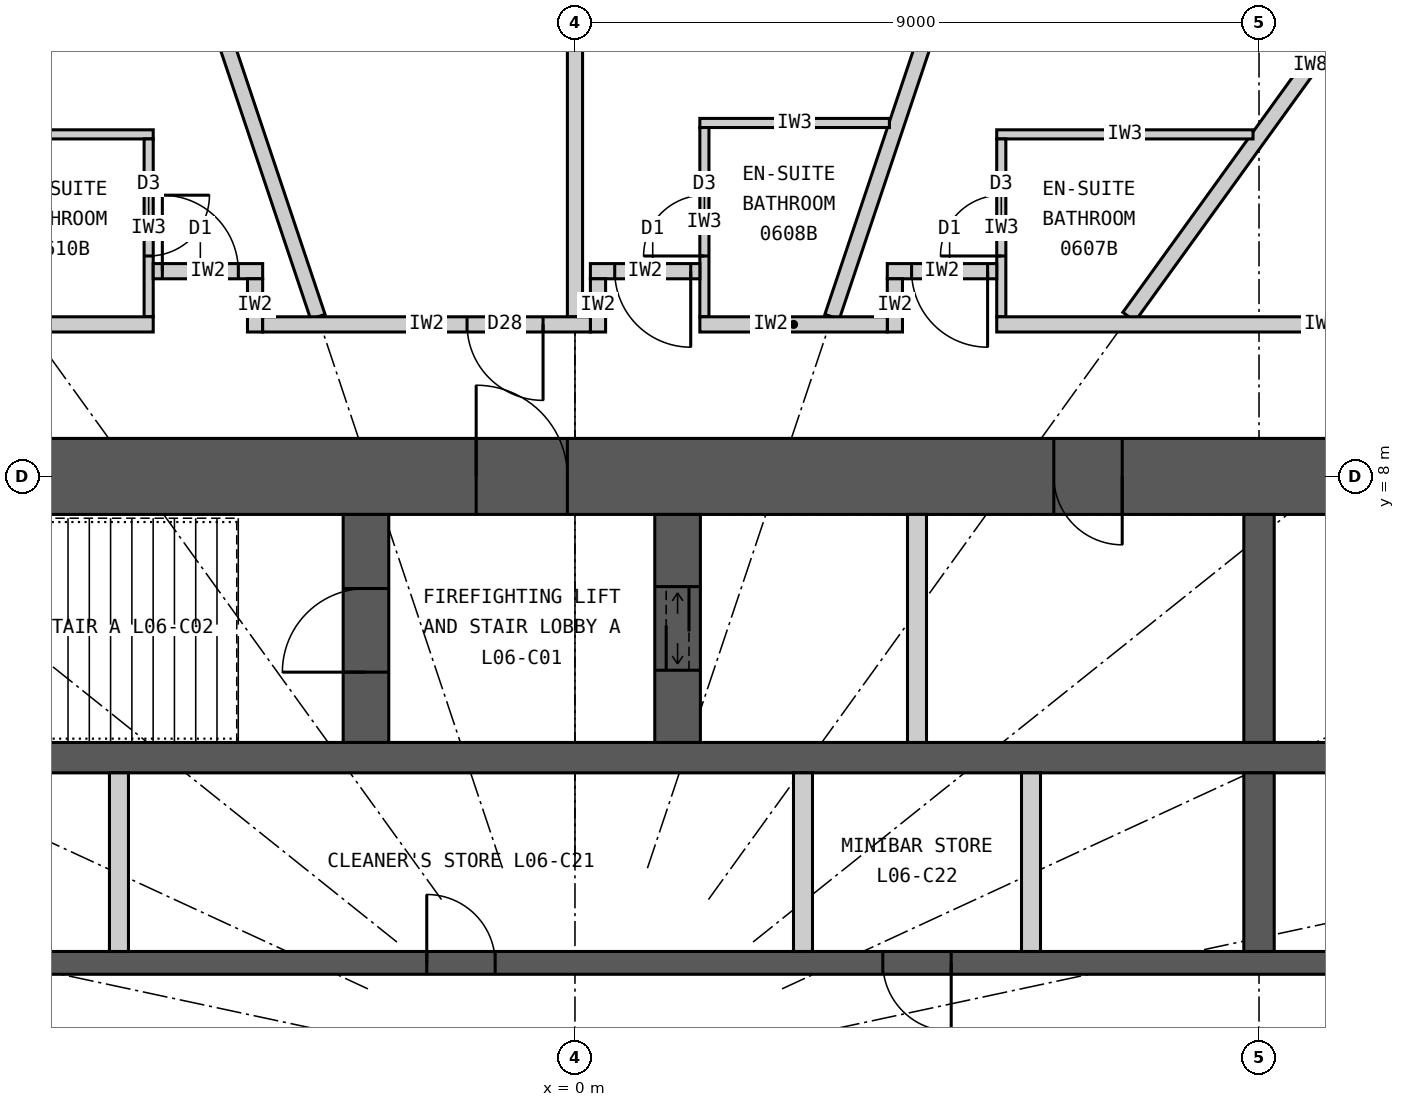
"""IFC4 building model, lengths in metres.
Left out: names, types, materials, properties, quantities, classifications, styles, units other than length and angle.
Written with IfcOpenShell. Run it as: python <this file> out.ifc"""

import sys

from ifc_helpers import new_model, si_unit, direction, frame, frame_2d, origin, place, context, subcontext, project, spatial, rectangle, extrude, element, fill, save


model = new_model("IFC4")
c1 = context("Model", 3, precision=1e-05, world=origin(), true_north=direction((0.0, 1.0)))
c2 = subcontext(c1, "Body", "Model", "MODEL_VIEW")
j1 = project(units=[si_unit("LENGTHUNIT", "METRE"), si_unit("PLANEANGLEUNIT", "RADIAN")], contexts=[c1])
p1 = place(None, origin())
s1 = spatial("IfcSite", under=j1, at=p1, CompositionType="ELEMENT")
p2 = place(p1, origin())
s2 = spatial("IfcBuilding", under=s1, at=p2, CompositionType="ELEMENT")
p3 = place(p2, frame((0.0, 0.0, 32.7)))
s3 = spatial("IfcBuildingStorey", under=s2, at=p3, CompositionType="ELEMENT", Elevation=32.7)
p4 = place(p3, frame((-12.5, 8.0, 0.0), z_axis=(0.0, 0.0, 1.0), x_axis=(1.0, 0.0, 0.0)))
e1 = element("IfcWall", 1, at=p4, inside=s3, PredefinedType="SHEAR", context=c2, shape_type="SweptSolid", body=[
    extrude(rectangle(XDim=25.0, YDim=1.0, at=frame_2d((12.5, 0.0))), origin(), (0.0, 0.0, 1.0), 3.3),
])
p5 = place(p4, frame((11.2, 0.0, 0.0)))
e2 = element("IfcOpeningElement", 2, at=p5, cuts=e1, PredefinedType="OPENING", context=c2, shape_type="SweptSolid", body=[
    extrude(rectangle(XDim=1.2, YDim=2.2, at=frame_2d((0.6, 1.1))), frame((0.0, 0.51, 0.0), z_axis=(0.0, -1.0, 0.0), x_axis=(1.0, 0.0, 0.0)), (0.0, 0.0, 1.0), 1.02),
])
p6 = place(p4, frame((18.8, 0.0, 0.0)))
e3 = element("IfcOpeningElement", 3, at=p6, cuts=e1, PredefinedType="OPENING", context=c2, shape_type="SweptSolid", body=[
    extrude(rectangle(XDim=0.9, YDim=2.2, at=frame_2d((0.45, 1.1))), frame((0.0, 0.51, 0.0), z_axis=(0.0, -1.0, 0.0), x_axis=(1.0, 0.0, 0.0)), (0.0, 0.0, 1.0), 1.02),
])
p7 = place(p3, frame((-11.5, 4.3, 0.0), z_axis=(0.0, 0.0, 1.0), x_axis=(1.0, 0.0, 0.0)))
e4 = element("IfcWall", 4, at=p7, inside=s3, PredefinedType="SHEAR", context=c2, shape_type="SweptSolid", body=[
    extrude(rectangle(XDim=23.0, YDim=0.4, at=frame_2d((11.5, 0.0))), origin(), (0.0, 0.0, 1.0), 3.3),
])
p8 = place(p3, frame((-11.5, 1.6, 0.0), z_axis=(0.0, 0.0, 1.0), x_axis=(1.0, 0.0, 0.0)))
e5 = element("IfcWall", 5, at=p8, inside=s3, PredefinedType="SHEAR", context=c2, shape_type="SweptSolid", body=[
    extrude(rectangle(XDim=23.0, YDim=0.3, at=frame_2d((11.5, 0.0))), origin(), (0.0, 0.0, 1.0), 3.3),
])
p9 = place(p8, frame((0.45, 0.0, 0.0)))
e6 = element("IfcOpeningElement", 6, at=p9, cuts=e5, PredefinedType="OPENING", context=c2, shape_type="SweptSolid", body=[
    extrude(rectangle(XDim=1.1, YDim=2.2, at=frame_2d((0.55, 1.1))), frame((0.0, 0.16, 0.0), z_axis=(0.0, -1.0, 0.0), x_axis=(1.0, 0.0, 0.0)), (0.0, 0.0, 1.0), 0.32),
])
p10 = place(p8, frame((3.45, 0.0, 0.0)))
e7 = element("IfcOpeningElement", 7, at=p10, cuts=e5, PredefinedType="OPENING", context=c2, shape_type="SweptSolid", body=[
    extrude(rectangle(XDim=1.1, YDim=2.2, at=frame_2d((0.55, 1.1))), frame((0.0, 0.16, 0.0), z_axis=(0.0, -1.0, 0.0), x_axis=(1.0, 0.0, 0.0)), (0.0, 0.0, 1.0), 0.32),
])
p11 = place(p8, frame((9.55, 0.0, 0.0)))
e8 = element("IfcOpeningElement", 8, at=p11, cuts=e5, PredefinedType="OPENING", context=c2, shape_type="SweptSolid", body=[
    extrude(rectangle(XDim=0.9, YDim=2.2, at=frame_2d((0.45, 1.1))), frame((0.0, 0.16, 0.0), z_axis=(0.0, -1.0, 0.0), x_axis=(1.0, 0.0, 0.0)), (0.0, 0.0, 1.0), 0.32),
])
p12 = place(p8, frame((15.55, 0.0, 0.0)))
e9 = element("IfcOpeningElement", 9, at=p12, cuts=e5, PredefinedType="OPENING", context=c2, shape_type="SweptSolid", body=[
    extrude(rectangle(XDim=0.9, YDim=2.2, at=frame_2d((0.45, 1.1))), frame((0.0, 0.16, 0.0), z_axis=(0.0, -1.0, 0.0), x_axis=(1.0, 0.0, 0.0)), (0.0, 0.0, 1.0), 0.32),
])
p13 = place(p3, frame((9.0, 4.5, 0.0), z_axis=(0.0, 0.0, 1.0), x_axis=(0.0, 1.0, 0.0)))
e10 = element("IfcWall", 10, at=p13, inside=s3, PredefinedType="SHEAR", context=c2, shape_type="SweptSolid", body=[
    extrude(rectangle(XDim=3.0, YDim=0.4, at=frame_2d((1.5, 0.0))), origin(), (0.0, 0.0, 1.0), 3.3),
])
p14 = place(p3, frame((9.0, 1.75, 0.0), z_axis=(0.0, 0.0, 1.0), x_axis=(0.0, 1.0, 0.0)))
e11 = element("IfcWall", 11, at=p14, inside=s3, PredefinedType="SHEAR", context=c2, shape_type="SweptSolid", body=[
    extrude(rectangle(XDim=2.35, YDim=0.4, at=frame_2d((1.175, 0.0))), origin(), (0.0, 0.0, 1.0), 3.3),
])
p15 = place(p3, frame((-2.75, 4.5, 0.0), z_axis=(0.0, 0.0, 1.0), x_axis=(0.0, 1.0, 0.0)))
e12 = element("IfcWall", 12, at=p15, inside=s3, PredefinedType="SHEAR", context=c2, shape_type="SweptSolid", body=[
    extrude(rectangle(XDim=3.0, YDim=0.6, at=frame_2d((1.5, 0.0))), origin(), (0.0, 0.0, 1.0), 3.3),
])
p16 = place(p15, frame((0.925, 0.0, 0.0)))
e13 = element("IfcOpeningElement", 13, at=p16, cuts=e12, PredefinedType="OPENING", context=c2, shape_type="SweptSolid", body=[
    extrude(rectangle(XDim=1.1, YDim=2.2, at=frame_2d((0.55, 1.1))), frame((0.0, 0.31, 0.0), z_axis=(0.0, -1.0, 0.0), x_axis=(1.0, 0.0, 0.0)), (0.0, 0.0, 1.0), 0.62),
])
p17 = place(p3, frame((1.35, 4.5, 0.0), z_axis=(0.0, 0.0, 1.0), x_axis=(0.0, 1.0, 0.0)))
e14 = element("IfcWall", 14, at=p17, inside=s3, PredefinedType="SHEAR", context=c2, shape_type="SweptSolid", body=[
    extrude(rectangle(XDim=3.0, YDim=0.6, at=frame_2d((1.5, 0.0))), origin(), (0.0, 0.0, 1.0), 3.3),
])
p18 = place(p17, frame((0.95, 0.0, 0.0)))
e15 = element("IfcOpeningElement", 15, at=p18, cuts=e14, PredefinedType="OPENING", context=c2, shape_type="SweptSolid", body=[
    extrude(rectangle(XDim=1.1, YDim=2.2, at=frame_2d((0.55, 1.1))), frame((0.0, 0.31, 0.0), z_axis=(0.0, -1.0, 0.0), x_axis=(1.0, 0.0, 0.0)), (0.0, 0.0, 1.0), 0.62),
])
p19 = place(p3, frame((4.5, 4.5, 0.0), z_axis=(0.0, 0.0, 1.0), x_axis=(0.0, 1.0, 0.0)))
e16 = element("IfcWall", 16, at=p19, inside=s3, PredefinedType="PARTITIONING", context=c2, shape_type="SweptSolid", body=[
    extrude(rectangle(XDim=3.0, YDim=0.25, at=frame_2d((1.5, 0.0))), origin(), (0.0, 0.0, 1.0), 3.3),
])
for number, where, z_axis, x_axis in (
    (17, (-6.0, 1.75, 0.0), (0.0, 0.0, 1.0), (0.0, 1.0, 0.0)),
    (18, (3.0, 1.75, 0.0), (0.0, 0.0, 1.0), (0.0, 1.0, 0.0)),
    (19, (6.0, 1.75, 0.0), (0.0, 0.0, 1.0), (0.0, 1.0, 0.0)),
):
    element("IfcWall", number, at=place(p3, frame(where, z_axis=z_axis, x_axis=x_axis)), inside=s3, PredefinedType="PARTITIONING", context=c2, shape_type="SweptSolid", body=[
        extrude(rectangle(XDim=2.35, YDim=0.25, at=frame_2d((1.175, 0.0))), origin(), (0.0, 0.0, 1.0), 3.3),
    ])
p20 = place(p3, frame((7.289, 10.1, 0.0), z_axis=(0.0, 0.0, 1.0), x_axis=(0.585216319319, 0.810877216108, 0.0)))
e20 = element("IfcWall", 20, at=p20, inside=s3, PredefinedType="PARTITIONING", context=c2, shape_type="SweptSolid", body=[
    extrude(rectangle(XDim=8.16, YDim=0.2, at=frame_2d((4.08, 0.0))), origin(), (0.0, 0.0, 1.0), 2.32),
])
p21 = place(p3, frame((3.383, 10.1, 0.0), z_axis=(0.0, 0.0, 1.0), x_axis=(0.317593727596, 0.948226884344, 0.0)))
e21 = element("IfcWall", 21, at=p21, inside=s3, PredefinedType="PARTITIONING", context=c2, shape_type="SweptSolid", body=[
    extrude(rectangle(XDim=8.899, YDim=0.2, at=frame_2d((4.449, 0.0))), origin(), (0.0, 0.0, 1.0), 2.32),
])
p22 = place(p3, frame((0.0, 10.1, 0.0), z_axis=(0.0, 0.0, 1.0), x_axis=(0.0, 1.0, 0.0)))
e22 = element("IfcWall", 22, at=p22, inside=s3, PredefinedType="PARTITIONING", context=c2, shape_type="SweptSolid", body=[
    extrude(rectangle(XDim=9.05, YDim=0.2, at=frame_2d((4.525, 0.0))), origin(), (0.0, 0.0, 1.0), 2.32),
])
p23 = place(p3, frame((-3.383, 10.1, 0.0), z_axis=(0.0, 0.0, 1.0), x_axis=(-0.317593727596, 0.948226884344, 0.0)))
e23 = element("IfcWall", 23, at=p23, inside=s3, PredefinedType="PARTITIONING", context=c2, shape_type="SweptSolid", body=[
    extrude(rectangle(XDim=8.899, YDim=0.2, at=frame_2d((4.449, 0.0))), origin(), (0.0, 0.0, 1.0), 2.32),
])
p24 = place(p3, frame((8.921, 12.5, 0.0), z_axis=(0.0, 0.0, 1.0), x_axis=(-1.0, 0.0, 0.0)))
e24 = element("IfcWall", 24, at=p24, inside=s3, PredefinedType="PARTITIONING", context=c2, shape_type="SweptSolid", body=[
    extrude(rectangle(XDim=3.372, YDim=0.12, at=frame_2d((1.686, 0.0))), origin(), (0.0, 0.0, 1.0), 3.12),
])
p25 = place(p3, frame((5.609, 10.1, 0.0), z_axis=(0.0, 0.0, 1.0), x_axis=(0.0, 1.0, 0.0)))
e25 = element("IfcWall", 25, at=p25, inside=s3, PredefinedType="PARTITIONING", context=c2, shape_type="SweptSolid", body=[
    extrude(rectangle(XDim=2.34, YDim=0.12, at=frame_2d((1.17, 0.0))), origin(), (0.0, 0.0, 1.0), 3.12),
])
p26 = place(p25, frame((0.8, 0.0, 0.0)))
e26 = element("IfcOpeningElement", 26, at=p26, cuts=e25, PredefinedType="OPENING", context=c2, shape_type="SweptSolid", body=[
    extrude(rectangle(XDim=0.8, YDim=2.1, at=frame_2d((0.4, 1.05))), frame((0.0, 0.07, 0.0), z_axis=(0.0, -1.0, 0.0), x_axis=(1.0, 0.0, 0.0)), (0.0, 0.0, 1.0), 0.14),
])
p27 = place(p3, frame((4.137, 12.65, 0.0), z_axis=(0.0, 0.0, 1.0), x_axis=(-1.0, 0.0, 0.0)))
e27 = element("IfcWall", 27, at=p27, inside=s3, PredefinedType="PARTITIONING", context=c2, shape_type="SweptSolid", body=[
    extrude(rectangle(XDim=2.494, YDim=0.12, at=frame_2d((1.247, 0.0))), origin(), (0.0, 0.0, 1.0), 3.12),
])
p28 = place(p3, frame((1.703, 10.1, 0.0), z_axis=(0.0, 0.0, 1.0), x_axis=(0.0, 1.0, 0.0)))
e28 = element("IfcWall", 28, at=p28, inside=s3, PredefinedType="PARTITIONING", context=c2, shape_type="SweptSolid", body=[
    extrude(rectangle(XDim=2.49, YDim=0.12, at=frame_2d((1.245, 0.0))), origin(), (0.0, 0.0, 1.0), 3.12),
])
p29 = place(p28, frame((0.8, 0.0, 0.0)))
e29 = element("IfcOpeningElement", 29, at=p29, cuts=e28, PredefinedType="OPENING", context=c2, shape_type="SweptSolid", body=[
    extrude(rectangle(XDim=0.8, YDim=2.1, at=frame_2d((0.4, 1.05))), frame((0.0, 0.07, 0.0), z_axis=(0.0, -1.0, 0.0), x_axis=(1.0, 0.0, 0.0)), (0.0, 0.0, 1.0), 0.14),
])
p30 = place(p3, frame((-8.921, 12.5, 0.0), z_axis=(0.0, 0.0, 1.0), x_axis=(1.0, 0.0, 0.0)))
e30 = element("IfcWall", 30, at=p30, inside=s3, PredefinedType="PARTITIONING", context=c2, shape_type="SweptSolid", body=[
    extrude(rectangle(XDim=3.372, YDim=0.12, at=frame_2d((1.686, 0.0))), origin(), (0.0, 0.0, 1.0), 3.12),
])
p31 = place(p3, frame((-5.609, 10.1, 0.0), z_axis=(0.0, 0.0, 1.0), x_axis=(0.0, 1.0, 0.0)))
e31 = element("IfcWall", 31, at=p31, inside=s3, PredefinedType="PARTITIONING", context=c2, shape_type="SweptSolid", body=[
    extrude(rectangle(XDim=2.34, YDim=0.12, at=frame_2d((1.17, 0.0))), origin(), (0.0, 0.0, 1.0), 3.12),
])
p32 = place(p31, frame((0.8, 0.0, 0.0)))
e32 = element("IfcOpeningElement", 32, at=p32, cuts=e31, PredefinedType="OPENING", context=c2, shape_type="SweptSolid", body=[
    extrude(rectangle(XDim=0.8, YDim=2.1, at=frame_2d((0.4, 1.05))), frame((0.0, 0.07, 0.0), z_axis=(0.0, -1.0, 0.0), x_axis=(1.0, 0.0, 0.0)), (0.0, 0.0, 1.0), 0.14),
])
p33 = place(p3, frame((4.109, 10.7, 0.0), z_axis=(0.0, 0.0, 1.0), x_axis=(1.0, 0.0, 0.0)))
e33 = element("IfcWall", 33, at=p33, inside=s3, PredefinedType="PARTITIONING", context=c2, shape_type="SweptSolid", body=[
    extrude(rectangle(XDim=1.44, YDim=0.2, at=frame_2d((0.72, 0.0))), origin(), (0.0, 0.0, 1.0), 3.12),
])
p34 = place(p33, frame((0.32, 0.0, 0.0)))
e34 = element("IfcOpeningElement", 34, at=p34, cuts=e33, PredefinedType="OPENING", context=c2, shape_type="SweptSolid", body=[
    extrude(rectangle(XDim=1.0, YDim=2.2, at=frame_2d((0.5, 1.1))), frame((0.0, 0.11, 0.0), z_axis=(0.0, -1.0, 0.0), x_axis=(1.0, 0.0, 0.0)), (0.0, 0.0, 1.0), 0.22),
])
p35 = place(p3, frame((4.209, 9.9, 0.0), z_axis=(0.0, 0.0, 1.0), x_axis=(0.0, 1.0, 0.0)))
e35 = element("IfcWall", 35, at=p35, inside=s3, PredefinedType="PARTITIONING", context=c2, shape_type="SweptSolid", body=[
    extrude(rectangle(XDim=0.7, YDim=0.2, at=frame_2d((0.35, 0.0))), origin(), (0.0, 0.0, 1.0), 3.12),
])
p36 = place(p3, frame((0.203, 10.7, 0.0), z_axis=(0.0, 0.0, 1.0), x_axis=(1.0, 0.0, 0.0)))
e36 = element("IfcWall", 36, at=p36, inside=s3, PredefinedType="PARTITIONING", context=c2, shape_type="SweptSolid", body=[
    extrude(rectangle(XDim=1.44, YDim=0.2, at=frame_2d((0.72, 0.0))), origin(), (0.0, 0.0, 1.0), 3.12),
])
p37 = place(p36, frame((0.32, 0.0, 0.0)))
e37 = element("IfcOpeningElement", 37, at=p37, cuts=e36, PredefinedType="OPENING", context=c2, shape_type="SweptSolid", body=[
    extrude(rectangle(XDim=1.0, YDim=2.2, at=frame_2d((0.5, 1.1))), frame((0.0, 0.11, 0.0), z_axis=(0.0, -1.0, 0.0), x_axis=(1.0, 0.0, 0.0)), (0.0, 0.0, 1.0), 0.22),
])
p38 = place(p3, frame((0.303, 9.9, 0.0), z_axis=(0.0, 0.0, 1.0), x_axis=(0.0, 1.0, 0.0)))
e38 = element("IfcWall", 38, at=p38, inside=s3, PredefinedType="PARTITIONING", context=c2, shape_type="SweptSolid", body=[
    extrude(rectangle(XDim=0.7, YDim=0.2, at=frame_2d((0.35, 0.0))), origin(), (0.0, 0.0, 1.0), 3.12),
])
p39 = place(p3, frame((-5.549, 10.7, 0.0), z_axis=(0.0, 0.0, 1.0), x_axis=(1.0, 0.0, 0.0)))
e39 = element("IfcWall", 39, at=p39, inside=s3, PredefinedType="PARTITIONING", context=c2, shape_type="SweptSolid", body=[
    extrude(rectangle(XDim=1.44, YDim=0.2, at=frame_2d((0.72, 0.0))), origin(), (0.0, 0.0, 1.0), 3.12),
])
p40 = place(p39, frame((0.12, 0.0, 0.0)))
e40 = element("IfcOpeningElement", 40, at=p40, cuts=e39, PredefinedType="OPENING", context=c2, shape_type="SweptSolid", body=[
    extrude(rectangle(XDim=1.0, YDim=2.2, at=frame_2d((0.5, 1.1))), frame((0.0, 0.11, 0.0), z_axis=(0.0, -1.0, 0.0), x_axis=(1.0, 0.0, 0.0)), (0.0, 0.0, 1.0), 0.22),
])
p41 = place(p3, frame((-4.209, 9.9, 0.0), z_axis=(0.0, 0.0, 1.0), x_axis=(0.0, 1.0, 0.0)))
e41 = element("IfcWall", 41, at=p41, inside=s3, PredefinedType="PARTITIONING", context=c2, shape_type="SweptSolid", body=[
    extrude(rectangle(XDim=0.7, YDim=0.2, at=frame_2d((0.35, 0.0))), origin(), (0.0, 0.0, 1.0), 3.12),
])
p42 = place(p3, frame((-10.179, 10.0, 0.0), z_axis=(0.0, 0.0, 1.0), x_axis=(1.0, 0.0, 0.0)))
e42 = element("IfcWall", 42, at=p42, inside=s3, PredefinedType="PARTITIONING", context=c2, shape_type="SweptSolid", body=[
    extrude(rectangle(XDim=4.63, YDim=0.2, at=frame_2d((2.315, 0.0))), origin(), (0.0, 0.0, 1.0), 3.12),
])
p43 = place(p3, frame((-4.109, 10.0, 0.0), z_axis=(0.0, 0.0, 1.0), x_axis=(1.0, 0.0, 0.0)))
e43 = element("IfcWall", 43, at=p43, inside=s3, PredefinedType="PARTITIONING", context=c2, shape_type="SweptSolid", body=[
    extrude(rectangle(XDim=4.312, YDim=0.2, at=frame_2d((2.156, 0.0))), origin(), (0.0, 0.0, 1.0), 3.12),
])
p44 = place(p43, frame((2.689, 0.0, 0.0)))
e44 = element("IfcOpeningElement", 44, at=p44, cuts=e43, PredefinedType="OPENING", context=c2, shape_type="SweptSolid", body=[
    extrude(rectangle(XDim=1.0, YDim=2.2, at=frame_2d((0.5, 1.1))), frame((0.0, 0.11, 0.0), z_axis=(0.0, -1.0, 0.0), x_axis=(1.0, 0.0, 0.0)), (0.0, 0.0, 1.0), 0.22),
])
p45 = place(p3, frame((1.643, 10.0, 0.0), z_axis=(0.0, 0.0, 1.0), x_axis=(1.0, 0.0, 0.0)))
e45 = element("IfcWall", 45, at=p45, inside=s3, PredefinedType="PARTITIONING", context=c2, shape_type="SweptSolid", body=[
    extrude(rectangle(XDim=2.466, YDim=0.2, at=frame_2d((1.233, 0.0))), origin(), (0.0, 0.0, 1.0), 3.12),
])
p46 = place(p3, frame((5.549, 10.0, 0.0), z_axis=(0.0, 0.0, 1.0), x_axis=(1.0, 0.0, 0.0)))
e46 = element("IfcWall", 46, at=p46, inside=s3, PredefinedType="PARTITIONING", context=c2, shape_type="SweptSolid", body=[
    extrude(rectangle(XDim=8.551, YDim=0.2, at=frame_2d((4.275, 0.0))), origin(), (0.0, 0.0, 1.0), 3.12),
])
p47 = place(p46, frame((5.656, 0.0, 0.0)))
e47 = element("IfcOpeningElement", 47, at=p47, cuts=e46, PredefinedType="OPENING", context=c2, shape_type="SweptSolid", body=[
    extrude(rectangle(XDim=1.0, YDim=2.2, at=frame_2d((0.5, 1.1))), frame((0.0, 0.11, 0.0), z_axis=(0.0, -1.0, 0.0), x_axis=(1.0, 0.0, 0.0)), (0.0, 0.0, 1.0), 0.22),
])
p48 = place(p26, origin())
e48 = element("IfcDoor", 48, at=p48, inside=s3, OperationType="SINGLE_SWING_LEFT", PredefinedType="DOOR", context=c2, shape_type="SweptSolid", body=[
    extrude(rectangle(XDim=0.8, YDim=2.1, at=frame_2d((0.4, 1.05))), frame((0.0, 0.025, 0.0), z_axis=(0.0, -1.0, 0.0), x_axis=(1.0, 0.0, 0.0)), (0.0, 0.0, 1.0), 0.05),
])
fill(e26, e48)
p49 = place(p34, origin())
e49 = element("IfcDoor", 49, at=p49, inside=s3, OperationType="SINGLE_SWING_RIGHT", PredefinedType="DOOR", context=c2, shape_type="SweptSolid", body=[
    extrude(rectangle(XDim=1.0, YDim=2.2, at=frame_2d((0.5, 1.1))), frame((0.0, 0.025, 0.0), z_axis=(0.0, -1.0, 0.0), x_axis=(1.0, 0.0, 0.0)), (0.0, 0.0, 1.0), 0.05),
])
fill(e34, e49)
p50 = place(p29, origin())
e50 = element("IfcDoor", 50, at=p50, inside=s3, OperationType="SINGLE_SWING_LEFT", PredefinedType="DOOR", context=c2, shape_type="SweptSolid", body=[
    extrude(rectangle(XDim=0.8, YDim=2.1, at=frame_2d((0.4, 1.05))), frame((0.0, 0.025, 0.0), z_axis=(0.0, -1.0, 0.0), x_axis=(1.0, 0.0, 0.0)), (0.0, 0.0, 1.0), 0.05),
])
fill(e29, e50)
p51 = place(p37, origin())
e51 = element("IfcDoor", 51, at=p51, inside=s3, OperationType="SINGLE_SWING_RIGHT", PredefinedType="DOOR", context=c2, shape_type="SweptSolid", body=[
    extrude(rectangle(XDim=1.0, YDim=2.2, at=frame_2d((0.5, 1.1))), frame((0.0, 0.025, 0.0), z_axis=(0.0, -1.0, 0.0), x_axis=(1.0, 0.0, 0.0)), (0.0, 0.0, 1.0), 0.05),
])
fill(e37, e51)
p52 = place(p44, origin())
e52 = element("IfcDoor", 52, at=p52, inside=s3, OperationType="SINGLE_SWING_RIGHT", PredefinedType="DOOR", context=c2, shape_type="SweptSolid", body=[
    extrude(rectangle(XDim=1.0, YDim=2.2, at=frame_2d((0.5, 1.1))), frame((0.0, 0.025, 0.0), z_axis=(0.0, -1.0, 0.0), x_axis=(1.0, 0.0, 0.0)), (0.0, 0.0, 1.0), 0.05),
])
fill(e44, e52)
p53 = place(p32, origin())
e53 = element("IfcDoor", 53, at=p53, inside=s3, OperationType="SINGLE_SWING_RIGHT", PredefinedType="DOOR", context=c2, shape_type="SweptSolid", body=[
    extrude(rectangle(XDim=0.8, YDim=2.1, at=frame_2d((0.4, 1.05))), frame((0.0, 0.025, 0.0), z_axis=(0.0, -1.0, 0.0), x_axis=(1.0, 0.0, 0.0)), (0.0, 0.0, 1.0), 0.05),
])
fill(e32, e53)
p54 = place(p40, origin())
e54 = element("IfcDoor", 54, at=p54, inside=s3, OperationType="SINGLE_SWING_LEFT", PredefinedType="DOOR", context=c2, shape_type="SweptSolid", body=[
    extrude(rectangle(XDim=1.0, YDim=2.2, at=frame_2d((0.5, 1.1))), frame((0.0, 0.025, 0.0), z_axis=(0.0, -1.0, 0.0), x_axis=(1.0, 0.0, 0.0)), (0.0, 0.0, 1.0), 0.05),
])
fill(e40, e54)
p55 = place(p5, origin())
e55 = element("IfcDoor", 55, at=p55, inside=s3, OperationType="SINGLE_SWING_LEFT", PredefinedType="DOOR", context=c2, shape_type="SweptSolid", body=[
    extrude(rectangle(XDim=1.2, YDim=2.2, at=frame_2d((0.6, 1.1))), frame((0.0, 0.025, 0.0), z_axis=(0.0, -1.0, 0.0), x_axis=(1.0, 0.0, 0.0)), (0.0, 0.0, 1.0), 0.05),
])
fill(e2, e55)
p56 = place(p16, origin())
e56 = element("IfcDoor", 56, at=p56, inside=s3, OperationType="SINGLE_SWING_LEFT", PredefinedType="DOOR", context=c2, shape_type="SweptSolid", body=[
    extrude(rectangle(XDim=1.1, YDim=2.2, at=frame_2d((0.55, 1.1))), frame((0.0, 0.025, 0.0), z_axis=(0.0, -1.0, 0.0), x_axis=(1.0, 0.0, 0.0)), (0.0, 0.0, 1.0), 0.05),
])
fill(e13, e56)
p57 = place(p18, origin())
e57 = element("IfcDoor", 57, at=p57, inside=s3, OperationType="DOUBLE_DOOR_SLIDING", PredefinedType="DOOR", context=c2, shape_type="SweptSolid", body=[
    extrude(rectangle(XDim=1.1, YDim=2.2, at=frame_2d((0.55, 1.1))), frame((0.0, 0.025, 0.0), z_axis=(0.0, -1.0, 0.0), x_axis=(1.0, 0.0, 0.0)), (0.0, 0.0, 1.0), 0.05),
])
fill(e15, e57)
p58 = place(p6, origin())
e58 = element("IfcDoor", 58, at=p58, inside=s3, OperationType="SINGLE_SWING_RIGHT", PredefinedType="DOOR", context=c2, shape_type="SweptSolid", body=[
    extrude(rectangle(XDim=0.9, YDim=2.2, at=frame_2d((0.45, 1.1))), frame((0.0, 0.025, 0.0), z_axis=(0.0, -1.0, 0.0), x_axis=(1.0, 0.0, 0.0)), (0.0, 0.0, 1.0), 0.05),
])
fill(e3, e58)
p59 = place(p11, origin())
e59 = element("IfcDoor", 59, at=p59, inside=s3, OperationType="SINGLE_SWING_LEFT", PredefinedType="DOOR", context=c2, shape_type="SweptSolid", body=[
    extrude(rectangle(XDim=0.9, YDim=2.2, at=frame_2d((0.45, 1.1))), frame((0.0, 0.025, 0.0), z_axis=(0.0, -1.0, 0.0), x_axis=(1.0, 0.0, 0.0)), (0.0, 0.0, 1.0), 0.05),
])
fill(e8, e59)
p60 = place(p12, origin())
e60 = element("IfcDoor", 60, at=p60, inside=s3, OperationType="SINGLE_SWING_RIGHT", PredefinedType="DOOR", context=c2, shape_type="SweptSolid", body=[
    extrude(rectangle(XDim=0.9, YDim=2.2, at=frame_2d((0.45, 1.1))), frame((0.0, 0.025, 0.0), z_axis=(0.0, -1.0, 0.0), x_axis=(1.0, 0.0, 0.0)), (0.0, 0.0, 1.0), 0.05),
])
fill(e9, e60)
save(model, sys.argv[1])
